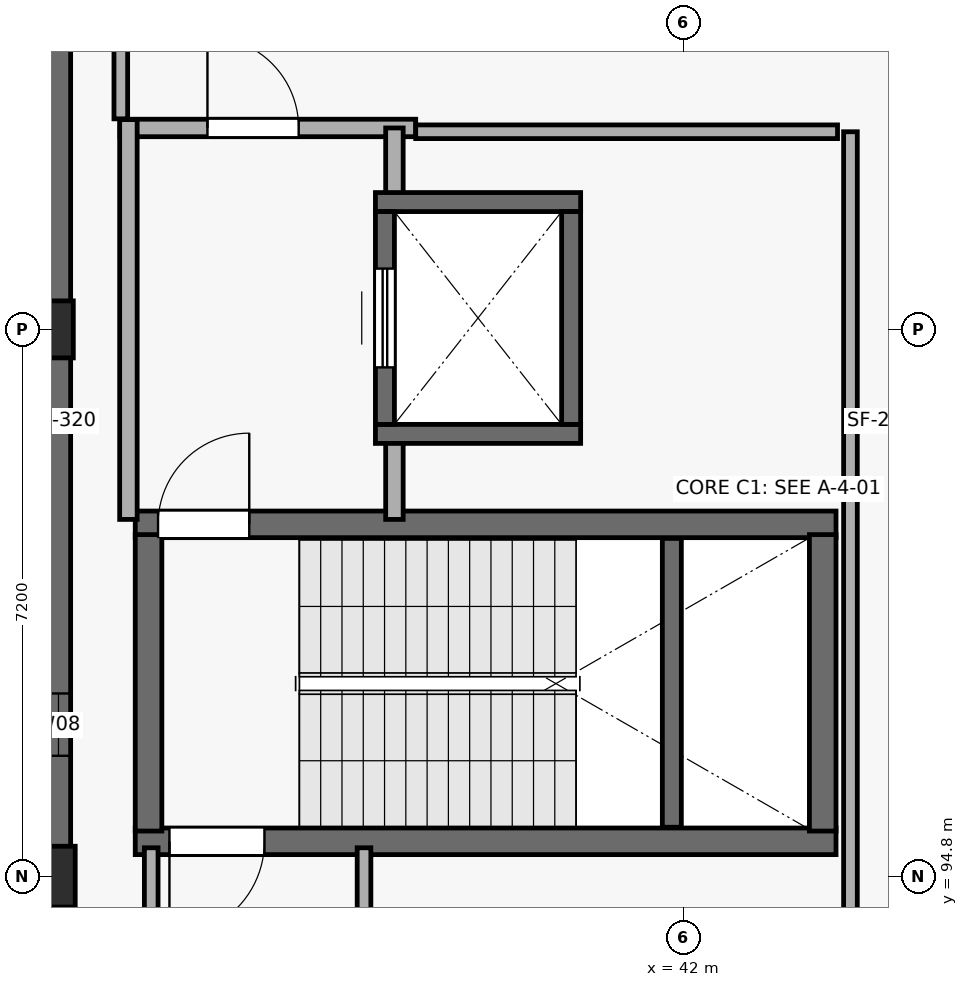
"""IFC4 building model, lengths in metres.
Left out: names, types, materials, properties, quantities, classifications, styles, units other than length and angle.
Written with IfcOpenShell. Run it as: python <this file> out.ifc"""

import sys

from ifc_helpers import new_model, si_unit, direction, frame, frame_2d, origin, origin_2d, place, context, subcontext, project, spatial, rectangle, extrude, element, fill, save


model = new_model("IFC4")
c1 = context("Model", 3, precision=1e-05, world=origin(), true_north=direction((0.0, 1.0)))
c2 = subcontext(c1, "Body", "Model", "MODEL_VIEW")
j1 = project(units=[si_unit("LENGTHUNIT", "METRE"), si_unit("PLANEANGLEUNIT", "RADIAN")], contexts=[c1])
p1 = place(None, origin())
s1 = spatial("IfcSite", under=j1, at=p1, CompositionType="ELEMENT")
p2 = place(p1, origin())
s2 = spatial("IfcBuilding", under=s1, at=p2, CompositionType="ELEMENT")
p3 = place(p2, frame((0.0, 0.0, 25.5)))
s3 = spatial("IfcBuildingStorey", under=s2, at=p3, CompositionType="ELEMENT", Elevation=25.5)
p4 = place(p3, frame((33.6, 94.8, 0.0), z_axis=(0.0, 0.0, 1.0), x_axis=(1.0, 0.0, 0.0)))
e1 = element("IfcColumn", 1, at=p4, inside=s3, PredefinedType="COLUMN", context=c2, shape_type="SweptSolid", body=[
    extrude(rectangle(XDim=0.8, YDim=0.8, at=origin_2d()), origin(), (0.0, 0.0, 1.0), 5.1),
])
p5 = place(p3, frame((33.6, 102.0, 0.0), z_axis=(0.0, 0.0, 1.0), x_axis=(1.0, 0.0, 0.0)))
e2 = element("IfcColumn", 2, at=p5, inside=s3, PredefinedType="COLUMN", context=c2, shape_type="SweptSolid", body=[
    extrude(rectangle(XDim=0.75, YDim=0.75, at=origin_2d()), origin(), (0.0, 0.0, 1.0), 5.1),
])
p6 = place(p3, frame((33.78, 91.2, 0.0), z_axis=(0.0, 0.0, 1.0), x_axis=(0.0, 1.0, 0.0)))
e3 = element("IfcWall", 3, at=p6, inside=s3, PredefinedType="SOLIDWALL", context=c2, shape_type="SweptSolid", body=[
    extrude(rectangle(XDim=19.2, YDim=0.32, at=frame_2d((9.6, 0.0))), origin(), (0.0, 0.0, 1.0), 4.82),
])
p7 = place(p6, frame((5.19, 0.0, 0.75)))
e4 = element("IfcOpeningElement", 4, at=p7, cuts=e3, PredefinedType="OPENING", context=c2, shape_type="SweptSolid", body=[
    extrude(rectangle(XDim=0.82, YDim=2.65, at=frame_2d((0.41, 1.325))), frame((0.0, 0.17, 0.0), z_axis=(0.0, -1.0, 0.0), x_axis=(1.0, 0.0, 0.0)), (0.0, 0.0, 1.0), 0.34),
])
p8 = place(p6, frame((15.27, 0.0, 0.75)))
e5 = element("IfcOpeningElement", 5, at=p8, cuts=e3, PredefinedType="OPENING", context=c2, shape_type="SweptSolid", body=[
    extrude(rectangle(XDim=0.82, YDim=3.05, at=frame_2d((0.41, 1.525))), frame((0.0, 0.17, 0.0), z_axis=(0.0, -1.0, 0.0), x_axis=(1.0, 0.0, 0.0)), (0.0, 0.0, 1.0), 0.34),
])
p9 = place(p3, frame((34.79, 95.265, 0.0), z_axis=(0.0, 0.0, 1.0), x_axis=(1.0, 0.0, 0.0)))
e6 = element("IfcWall", 6, at=p9, inside=s3, PredefinedType="SHEAR", context=c2, shape_type="SweptSolid", body=[
    extrude(rectangle(XDim=9.22, YDim=0.35, at=frame_2d((4.61, 0.0))), origin(), (0.0, 0.0, 1.0), 4.82),
])
p10 = place(p9, frame((0.45, 0.0, 0.0)))
e7 = element("IfcOpeningElement", 7, at=p10, cuts=e6, PredefinedType="OPENING", context=c2, shape_type="SweptSolid", body=[
    extrude(rectangle(XDim=1.25, YDim=2.2, at=frame_2d((0.625, 1.1))), frame((0.0, 0.185, 0.0), z_axis=(0.0, -1.0, 0.0), x_axis=(1.0, 0.0, 0.0)), (0.0, 0.0, 1.0), 0.37),
])
p11 = place(p3, frame((44.01, 99.435, 0.0), z_axis=(0.0, 0.0, 1.0), x_axis=(-1.0, 0.0, 0.0)))
e8 = element("IfcWall", 8, at=p11, inside=s3, PredefinedType="SHEAR", context=c2, shape_type="SweptSolid", body=[
    extrude(rectangle(XDim=9.22, YDim=0.35, at=frame_2d((4.61, 0.0))), origin(), (0.0, 0.0, 1.0), 4.82),
])
p12 = place(p11, frame((7.72, 0.0, 0.0)))
e9 = element("IfcOpeningElement", 9, at=p12, cuts=e8, PredefinedType="OPENING", context=c2, shape_type="SweptSolid", body=[
    extrude(rectangle(XDim=1.2, YDim=2.2, at=frame_2d((0.6, 1.1))), frame((0.0, 0.185, 0.0), z_axis=(0.0, -1.0, 0.0), x_axis=(1.0, 0.0, 0.0)), (0.0, 0.0, 1.0), 0.37),
])
for number, where, z_axis, x_axis in (
    (10, (34.965, 95.4, 0.0), (0.0, 0.0, 1.0), (0.0, 1.0, 0.0)),
    (11, (43.835, 99.3, 0.0), (0.0, 0.0, 1.0), (0.0, -1.0, 0.0)),
):
    element("IfcWall", number, at=place(p3, frame(where, z_axis=z_axis, x_axis=x_axis)), inside=s3, PredefinedType="SHEAR", context=c2, shape_type="SweptSolid", body=[
        extrude(rectangle(XDim=3.9, YDim=0.35, at=frame_2d((1.95, 0.0))), origin(), (0.0, 0.0, 1.0), 4.82),
    ])
p13 = place(p3, frame((41.85, 95.45, 0.0), z_axis=(0.0, 0.0, 1.0), x_axis=(0.0, 1.0, 0.0)))
e12 = element("IfcWall", 12, at=p13, inside=s3, PredefinedType="SHEAR", context=c2, shape_type="SweptSolid", body=[
    extrude(rectangle(XDim=3.8, YDim=0.25, at=frame_2d((1.9, 0.0))), origin(), (0.0, 0.0, 1.0), 2.37),
])
p14 = place(p3, frame((34.59, 104.65, 0.0), z_axis=(0.0, 0.0, 1.0), x_axis=(1.0, 0.0, 0.0)))
e13 = element("IfcWall", 13, at=p14, inside=s3, PredefinedType="PARTITIONING", context=c2, shape_type="SweptSolid", body=[
    extrude(rectangle(XDim=3.89, YDim=0.23, at=frame_2d((1.945, 0.0))), origin(), (0.0, 0.0, 1.0), 4.82),
])
p15 = place(p14, frame((1.15, 0.0, 0.0)))
e14 = element("IfcOpeningElement", 14, at=p15, cuts=e13, PredefinedType="OPENING", context=c2, shape_type="SweptSolid", body=[
    extrude(rectangle(XDim=1.2, YDim=2.2, at=frame_2d((0.6, 1.1))), frame((0.0, 0.125, 0.0), z_axis=(0.0, -1.0, 0.0), x_axis=(1.0, 0.0, 0.0)), (0.0, 0.0, 1.0), 0.25),
])
p16 = place(p3, frame((34.7, 99.5, 0.0), z_axis=(0.0, 0.0, 1.0), x_axis=(0.0, 1.0, 0.0)))
e15 = element("IfcWall", 15, at=p16, inside=s3, PredefinedType="PARTITIONING", context=c2, shape_type="SweptSolid", body=[
    extrude(rectangle(XDim=5.26, YDim=0.23, at=frame_2d((2.63, 0.0))), origin(), (0.0, 0.0, 1.0), 4.82),
])
p17 = place(p3, frame((38.2, 104.65, 0.0), z_axis=(0.0, 0.0, 1.0), x_axis=(0.0, -1.0, 0.0)))
e16 = element("IfcWall", 16, at=p17, inside=s3, PredefinedType="PARTITIONING", context=c2, shape_type="SweptSolid", body=[
    extrude(rectangle(XDim=1.1, YDim=0.23, at=frame_2d((0.55, 0.0))), origin(), (0.0, 0.0, 1.0), 4.82),
])
p18 = place(p3, frame((38.2, 100.75, 0.0), z_axis=(0.0, 0.0, 1.0), x_axis=(0.0, -1.0, 0.0)))
e17 = element("IfcWall", 17, at=p18, inside=s3, PredefinedType="PARTITIONING", context=c2, shape_type="SweptSolid", body=[
    extrude(rectangle(XDim=1.25, YDim=0.23, at=frame_2d((0.625, 0.0))), origin(), (0.0, 0.0, 1.0), 4.82),
])
for number, where, z_axis, x_axis in (
    (18, (37.95, 100.625, 0.0), (0.0, 0.0, 1.0), (1.0, 0.0, 0.0)),
    (19, (40.65, 103.675, 0.0), (0.0, 0.0, 1.0), (-1.0, 0.0, 0.0)),
):
    element("IfcWall", number, at=place(p3, frame(where, z_axis=z_axis, x_axis=x_axis)), inside=s3, PredefinedType="SHEAR", context=c2, shape_type="SweptSolid", body=[
        extrude(rectangle(XDim=2.7, YDim=0.25, at=frame_2d((1.35, 0.0))), origin(), (0.0, 0.0, 1.0), 4.82),
    ])
p19 = place(p3, frame((38.075, 100.75, 0.0), z_axis=(0.0, 0.0, 1.0), x_axis=(0.0, 1.0, 0.0)))
e20 = element("IfcWall", 20, at=p19, inside=s3, PredefinedType="SHEAR", context=c2, shape_type="SweptSolid", body=[
    extrude(rectangle(XDim=2.8, YDim=0.25, at=frame_2d((1.4, 0.0))), origin(), (0.0, 0.0, 1.0), 4.82),
])
p20 = place(p19, frame((0.75, 0.0, 0.0)))
e21 = element("IfcOpeningElement", 21, at=p20, cuts=e20, PredefinedType="OPENING", context=c2, shape_type="SweptSolid", body=[
    extrude(rectangle(XDim=1.3, YDim=2.25, at=frame_2d((0.65, 1.125))), frame((0.0, 0.135, 0.0), z_axis=(0.0, -1.0, 0.0), x_axis=(1.0, 0.0, 0.0)), (0.0, 0.0, 1.0), 0.27),
])
p21 = place(p3, frame((40.525, 103.55, 0.0), z_axis=(0.0, 0.0, 1.0), x_axis=(0.0, -1.0, 0.0)))
e22 = element("IfcWall", 22, at=p21, inside=s3, PredefinedType="SHEAR", context=c2, shape_type="SweptSolid", body=[
    extrude(rectangle(XDim=2.8, YDim=0.25, at=frame_2d((1.4, 0.0))), origin(), (0.0, 0.0, 1.0), 4.82),
])
p22 = place(p3, frame((44.2, 104.6, 0.0), z_axis=(0.0, 0.0, 1.0), x_axis=(0.0, -1.0, 0.0)))
e23 = element("IfcWall", 23, at=p22, inside=s3, PredefinedType="PARTITIONING", context=c2, shape_type="SweptSolid", body=[
    extrude(rectangle(XDim=10.75, YDim=0.18, at=frame_2d((5.375, 0.0))), origin(), (0.0, 0.0, 1.0), 4.82),
])
p23 = place(p3, frame((38.48, 104.6, 0.0), z_axis=(0.0, 0.0, 1.0), x_axis=(1.0, 0.0, 0.0)))
e24 = element("IfcWall", 24, at=p23, inside=s3, PredefinedType="PARTITIONING", context=c2, shape_type="SweptSolid", body=[
    extrude(rectangle(XDim=5.55, YDim=0.18, at=frame_2d((2.775, 0.0))), origin(), (0.0, 0.0, 1.0), 4.82),
])
p24 = place(p3, frame((34.6, 106.98, 0.0), z_axis=(0.0, 0.0, 1.0), x_axis=(0.0, -1.0, 0.0)))
e25 = element("IfcWall", 25, at=p24, inside=s3, PredefinedType="PARTITIONING", context=c2, shape_type="SweptSolid", body=[
    extrude(rectangle(XDim=2.21, YDim=0.18, at=frame_2d((1.105, 0.0))), origin(), (0.0, 0.0, 1.0), 4.82),
])
p25 = place(p3, frame((37.8, 94.02, 0.0), z_axis=(0.0, 0.0, 1.0), x_axis=(0.0, 1.0, 0.0)))
e26 = element("IfcWall", 26, at=p25, inside=s3, PredefinedType="PARTITIONING", context=c2, shape_type="SweptSolid", body=[
    extrude(rectangle(XDim=1.16, YDim=0.18, at=frame_2d((0.58, 0.0))), origin(), (0.0, 0.0, 1.0), 4.82),
])
p26 = place(p3, frame((35.0, 95.18, 0.0), z_axis=(0.0, 0.0, 1.0), x_axis=(0.0, -1.0, 0.0)))
e27 = element("IfcWall", 27, at=p26, inside=s3, PredefinedType="PARTITIONING", context=c2, shape_type="SweptSolid", body=[
    extrude(rectangle(XDim=1.33, YDim=0.18, at=frame_2d((0.665, 0.0))), origin(), (0.0, 0.0, 1.0), 4.82),
])
p27 = place(p7, origin())
e28 = element("IfcWindow", 28, at=p27, inside=s3, PartitioningType="SINGLE_PANEL", PredefinedType="WINDOW", context=c2, shape_type="SweptSolid", body=[
    extrude(rectangle(XDim=0.82, YDim=2.65, at=frame_2d((0.41, 1.325))), frame((0.0, 0.03, 0.0), z_axis=(0.0, -1.0, 0.0), x_axis=(1.0, 0.0, 0.0)), (0.0, 0.0, 1.0), 0.06),
])
fill(e4, e28)
p28 = place(p10, origin())
e29 = element("IfcDoor", 29, at=p28, inside=s3, OperationType="SINGLE_SWING_RIGHT", PredefinedType="DOOR", context=c2, shape_type="SweptSolid", body=[
    extrude(rectangle(XDim=1.25, YDim=2.2, at=frame_2d((0.625, 1.1))), frame((0.0, 0.025, 0.0), z_axis=(0.0, -1.0, 0.0), x_axis=(1.0, 0.0, 0.0)), (0.0, 0.0, 1.0), 0.05),
])
fill(e7, e29)
p29 = place(p12, origin())
e30 = element("IfcDoor", 30, at=p29, inside=s3, OperationType="SINGLE_SWING_RIGHT", PredefinedType="DOOR", context=c2, shape_type="SweptSolid", body=[
    extrude(rectangle(XDim=1.2, YDim=2.2, at=frame_2d((0.6, 1.1))), frame((0.0, 0.025, 0.0), z_axis=(0.0, -1.0, 0.0), x_axis=(1.0, 0.0, 0.0)), (0.0, 0.0, 1.0), 0.05),
])
fill(e9, e30)
p30 = place(p15, origin())
e31 = element("IfcDoor", 31, at=p30, inside=s3, OperationType="SINGLE_SWING_LEFT", PredefinedType="DOOR", context=c2, shape_type="SweptSolid", body=[
    extrude(rectangle(XDim=1.2, YDim=2.2, at=frame_2d((0.6, 1.1))), frame((0.0, 0.025, 0.0), z_axis=(0.0, -1.0, 0.0), x_axis=(1.0, 0.0, 0.0)), (0.0, 0.0, 1.0), 0.05),
])
fill(e14, e31)
p31 = place(p20, origin())
e32 = element("IfcDoor", 32, at=p31, inside=s3, OperationType="SLIDING_TO_LEFT", PredefinedType="DOOR", context=c2, shape_type="SweptSolid", body=[
    extrude(rectangle(XDim=1.3, YDim=2.25, at=frame_2d((0.65, 1.125))), frame((0.0, 0.025, 0.0), z_axis=(0.0, -1.0, 0.0), x_axis=(1.0, 0.0, 0.0)), (0.0, 0.0, 1.0), 0.05),
])
fill(e21, e32)
save(model, sys.argv[1])
